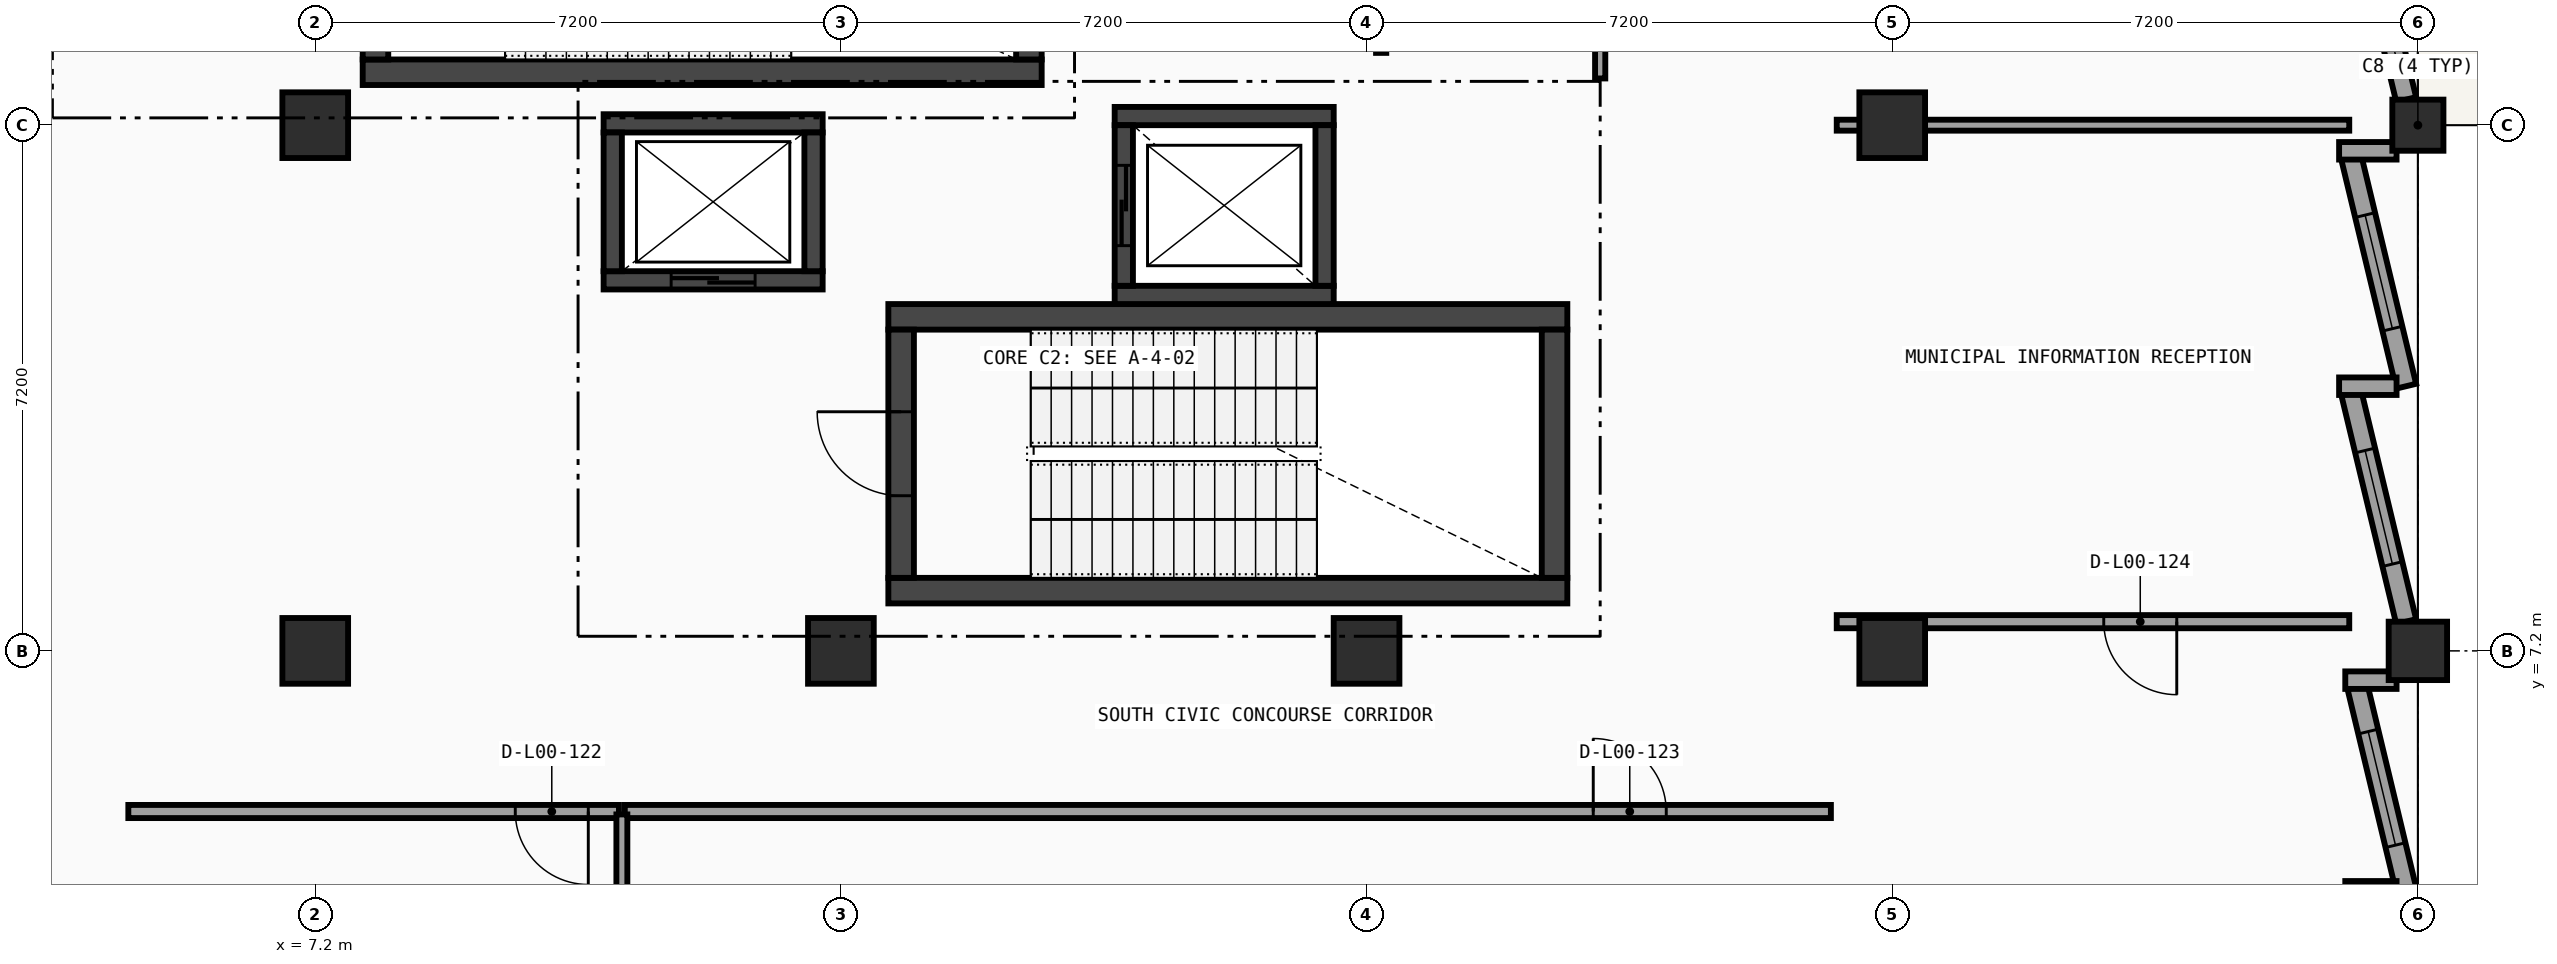
"""IFC4 building model, lengths in metres.
Left out: names, types, materials, properties, quantities, classifications, styles, units other than length and angle.
Written with IfcOpenShell. Run it as: python <this file> out.ifc"""

import sys

from ifc_helpers import new_model, si_unit, direction, frame, frame_2d, origin, origin_2d, place, context, subcontext, project, spatial, rectangle, circle, extrude, element, fill, save


model = new_model("IFC4")
c1 = context("Model", 3, precision=1e-05, world=origin(), true_north=direction((0.0, 1.0)))
c2 = subcontext(c1, "Body", "Model", "MODEL_VIEW")
j1 = project(units=[si_unit("LENGTHUNIT", "METRE"), si_unit("PLANEANGLEUNIT", "RADIAN")], contexts=[c1])
p1 = place(None, origin())
s1 = spatial("IfcSite", under=j1, at=p1, CompositionType="ELEMENT")
p2 = place(p1, origin())
s2 = spatial("IfcBuilding", under=s1, at=p2, CompositionType="ELEMENT")
p3 = place(p2, origin())
s3 = spatial("IfcBuildingStorey", under=s2, at=p3, CompositionType="ELEMENT", Elevation=0.0)
for number, where, z_axis, x_axis in (
    (1, (7.2, 7.2, 0.0), (0.0, 0.0, 1.0), (1.0, 0.0, 0.0)),
    (2, (7.2, 14.4, 0.0), (0.0, 0.0, 1.0), (1.0, 0.0, 0.0)),
    (3, (14.4, 7.2, 0.0), (0.0, 0.0, 1.0), (1.0, 0.0, 0.0)),
    (4, (21.6, 7.2, 0.0), (0.0, 0.0, 1.0), (1.0, 0.0, 0.0)),
    (5, (28.8, 7.2, 0.0), (0.0, 0.0, 1.0), (1.0, 0.0, 0.0)),
    (6, (28.8, 14.4, 0.0), (0.0, 0.0, 1.0), (1.0, 0.0, 0.0)),
):
    element("IfcColumn", number, at=place(p3, frame(where, z_axis=z_axis, x_axis=x_axis)), inside=s3, PredefinedType="COLUMN", context=c2, shape_type="SweptSolid", body=[
        extrude(rectangle(XDim=0.9, YDim=0.9, at=origin_2d()), origin(), (0.0, 0.0, 1.0), 5.4),
    ])
p4 = place(p3, frame((36.0, 7.2, 0.0), z_axis=(0.0, 0.0, 1.0), x_axis=(1.0, 0.0, 0.0)))
e7 = element("IfcColumn", 7, at=p4, inside=s3, PredefinedType="COLUMN", context=c2, shape_type="SweptSolid", body=[
    extrude(rectangle(XDim=0.8, YDim=0.8, at=origin_2d()), origin(), (0.0, 0.0, 1.0), 5.4),
])
p5 = place(p3, frame((36.0, 14.4, 0.0), z_axis=(0.0, 0.0, 1.0), x_axis=(1.0, 0.0, 0.0)))
e8 = element("IfcColumn", 8, at=p5, inside=s3, PredefinedType="COLUMN", context=c2, shape_type="SweptSolid", body=[
    extrude(circle(Radius=0.35, at=origin_2d()), origin(), (0.0, 0.0, 1.0), 5.4),
])
p6 = place(p3, frame((35.167, 17.555, 0.0), z_axis=(0.0, 0.0, 1.0), x_axis=(0.233481813001, -0.97236116901, 0.0)))
e9 = element("IfcWall", 9, at=p6, inside=s3, PredefinedType="SOLIDWALL", context=c2, shape_type="SweptSolid", body=[
    extrude(rectangle(XDim=2.884, YDim=0.28, at=frame_2d((1.442, 0.0))), origin(), (0.0, 0.0, 1.0), 4.461),
])
p7 = place(p6, frame((0.542, 0.0, 0.8)))
e10 = element("IfcOpeningElement", 10, at=p7, cuts=e9, PredefinedType="OPENING", context=c2, shape_type="SweptSolid", body=[
    extrude(rectangle(XDim=1.8, YDim=1.85, at=frame_2d((0.9, 0.925))), frame((0.0, 0.15, 0.0), z_axis=(0.0, -1.0, 0.0), x_axis=(1.0, 0.0, 0.0)), (0.0, 0.0, 1.0), 0.3),
])
p8 = place(p3, frame((35.088, 13.957, 0.0), z_axis=(0.0, 0.0, 1.0), x_axis=(0.233481900362, -0.972361148033, 0.0)))
e11 = element("IfcWall", 11, at=p8, inside=s3, PredefinedType="SOLIDWALL", context=c2, shape_type="SweptSolid", body=[
    extrude(rectangle(XDim=3.221, YDim=0.28, at=frame_2d((1.61, 0.0))), origin(), (0.0, 0.0, 1.0), 4.461),
])
p9 = place(p8, frame((0.81, 0.0, 0.8)))
e12 = element("IfcOpeningElement", 12, at=p9, cuts=e11, PredefinedType="OPENING", context=c2, shape_type="SweptSolid", body=[
    extrude(rectangle(XDim=1.6, YDim=1.75, at=frame_2d((0.8, 0.875))), frame((0.0, 0.15, 0.0), z_axis=(0.0, -1.0, 0.0), x_axis=(1.0, 0.0, 0.0)), (0.0, 0.0, 1.0), 0.3),
])
p10 = place(p3, frame((34.921, 14.049, 0.0), z_axis=(0.0, 0.0, 1.0), x_axis=(1.0, 0.0, 0.0)))
e13 = element("IfcWall", 13, at=p10, inside=s3, PredefinedType="SOLIDWALL", context=c2, shape_type="SweptSolid", body=[
    extrude(rectangle(XDim=0.787, YDim=0.24, at=frame_2d((0.394, 0.0))), origin(), (0.0, 0.0, 1.0), 5.12),
])
p11 = place(p3, frame((35.088, 10.733, 0.0), z_axis=(0.0, 0.0, 1.0), x_axis=(0.233481900362, -0.972361148033, 0.0)))
e14 = element("IfcWall", 14, at=p11, inside=s3, PredefinedType="SOLIDWALL", context=c2, shape_type="SweptSolid", body=[
    extrude(rectangle(XDim=3.221, YDim=0.28, at=frame_2d((1.61, 0.0))), origin(), (0.0, 0.0, 1.0), 4.461),
])
p12 = place(p11, frame((0.81, 0.0, 0.8)))
e15 = element("IfcOpeningElement", 15, at=p12, cuts=e14, PredefinedType="OPENING", context=c2, shape_type="SweptSolid", body=[
    extrude(rectangle(XDim=1.6, YDim=1.75, at=frame_2d((0.8, 0.875))), frame((0.0, 0.15, 0.0), z_axis=(0.0, -1.0, 0.0), x_axis=(1.0, 0.0, 0.0)), (0.0, 0.0, 1.0), 0.3),
])
p13 = place(p3, frame((34.921, 10.825, 0.0), z_axis=(0.0, 0.0, 1.0), x_axis=(1.0, 0.0, 0.0)))
e16 = element("IfcWall", 16, at=p13, inside=s3, PredefinedType="SOLIDWALL", context=c2, shape_type="SweptSolid", body=[
    extrude(rectangle(XDim=0.787, YDim=0.24, at=frame_2d((0.394, 0.0))), origin(), (0.0, 0.0, 1.0), 5.12),
])
p14 = place(p3, frame((35.173, 6.707, 0.0), z_axis=(0.0, 0.0, 1.0), x_axis=(0.233460183471, -0.972366362403, 0.0)))
e17 = element("IfcWall", 17, at=p14, inside=s3, PredefinedType="SOLIDWALL", context=c2, shape_type="SweptSolid", body=[
    extrude(rectangle(XDim=2.858, YDim=0.28, at=frame_2d((1.429, 0.0))), origin(), (0.0, 0.0, 1.0), 4.461),
])
p15 = place(p14, frame((0.629, 0.0, 0.8)))
e18 = element("IfcOpeningElement", 18, at=p15, cuts=e17, PredefinedType="OPENING", context=c2, shape_type="SweptSolid", body=[
    extrude(rectangle(XDim=1.6, YDim=1.75, at=frame_2d((0.8, 0.875))), frame((0.0, 0.15, 0.0), z_axis=(0.0, -1.0, 0.0), x_axis=(1.0, 0.0, 0.0)), (0.0, 0.0, 1.0), 0.3),
])
for number, where, z_axis, x_axis in (
    (19, (35.006, 6.799, 0.0), (0.0, 0.0, 1.0), (1.0, 0.0, 0.0)),
    (20, (35.006, 3.927, 0.0), (0.0, 0.0, 1.0), (1.0, 0.0, 0.0)),
):
    element("IfcWall", number, at=place(p3, frame(where, z_axis=z_axis, x_axis=x_axis)), inside=s3, PredefinedType="SOLIDWALL", context=c2, shape_type="SweptSolid", body=[
        extrude(rectangle(XDim=0.702, YDim=0.24, at=frame_2d((0.351, 0.0))), origin(), (0.0, 0.0, 1.0), 5.12),
    ])
p16 = place(p3, frame((7.85, 15.125, 0.0), z_axis=(0.0, 0.0, 1.0), x_axis=(1.0, 0.0, 0.0)))
e21 = element("IfcWall", 21, at=p16, inside=s3, PredefinedType="SHEAR", context=c2, shape_type="SweptSolid", body=[
    extrude(rectangle(XDim=9.3, YDim=0.35, at=frame_2d((4.65, 0.0))), origin(), (0.0, 0.0, 1.0), 5.12),
])
p17 = place(p3, frame((8.025, 18.7, 0.0), z_axis=(0.0, 0.0, 1.0), x_axis=(0.0, -1.0, 0.0)))
e22 = element("IfcWall", 22, at=p17, inside=s3, PredefinedType="SHEAR", context=c2, shape_type="SweptSolid", body=[
    extrude(rectangle(XDim=3.4, YDim=0.35, at=frame_2d((1.7, 0.0))), origin(), (0.0, 0.0, 1.0), 5.12),
])
p18 = place(p17, frame((1.125, 0.0, 0.0)))
e23 = element("IfcOpeningElement", 23, at=p18, cuts=e22, PredefinedType="OPENING", context=c2, shape_type="SweptSolid", body=[
    extrude(rectangle(XDim=1.15, YDim=2.1, at=frame_2d((0.575, 1.05))), frame((0.0, 0.185, 0.0), z_axis=(0.0, -1.0, 0.0), x_axis=(1.0, 0.0, 0.0)), (0.0, 0.0, 1.0), 0.37),
])
p19 = place(p3, frame((16.975, 15.3, 0.0), z_axis=(0.0, 0.0, 1.0), x_axis=(0.0, 1.0, 0.0)))
e24 = element("IfcWall", 24, at=p19, inside=s3, PredefinedType="SHEAR", context=c2, shape_type="SweptSolid", body=[
    extrude(rectangle(XDim=3.4, YDim=0.35, at=frame_2d((1.7, 0.0))), origin(), (0.0, 0.0, 1.0), 5.12),
])
for number, where, z_axis, x_axis in (
    (25, (15.05, 8.025, 0.0), (0.0, 0.0, 1.0), (1.0, 0.0, 0.0)),
    (26, (24.35, 11.775, 0.0), (0.0, 0.0, 1.0), (-1.0, 0.0, 0.0)),
):
    element("IfcWall", number, at=place(p3, frame(where, z_axis=z_axis, x_axis=x_axis)), inside=s3, PredefinedType="SHEAR", context=c2, shape_type="SweptSolid", body=[
        extrude(rectangle(XDim=9.3, YDim=0.35, at=frame_2d((4.65, 0.0))), origin(), (0.0, 0.0, 1.0), 5.12),
    ])
p20 = place(p3, frame((15.225, 11.6, 0.0), z_axis=(0.0, 0.0, 1.0), x_axis=(0.0, -1.0, 0.0)))
e27 = element("IfcWall", 27, at=p20, inside=s3, PredefinedType="SHEAR", context=c2, shape_type="SweptSolid", body=[
    extrude(rectangle(XDim=3.4, YDim=0.35, at=frame_2d((1.7, 0.0))), origin(), (0.0, 0.0, 1.0), 5.12),
])
p21 = place(p20, frame((1.125, 0.0, 0.0)))
e28 = element("IfcOpeningElement", 28, at=p21, cuts=e27, PredefinedType="OPENING", context=c2, shape_type="SweptSolid", body=[
    extrude(rectangle(XDim=1.15, YDim=2.1, at=frame_2d((0.575, 1.05))), frame((0.0, 0.185, 0.0), z_axis=(0.0, -1.0, 0.0), x_axis=(1.0, 0.0, 0.0)), (0.0, 0.0, 1.0), 0.37),
])
p22 = place(p3, frame((24.175, 8.2, 0.0), z_axis=(0.0, 0.0, 1.0), x_axis=(0.0, 1.0, 0.0)))
e29 = element("IfcWall", 29, at=p22, inside=s3, PredefinedType="SHEAR", context=c2, shape_type="SweptSolid", body=[
    extrude(rectangle(XDim=3.4, YDim=0.35, at=frame_2d((1.7, 0.0))), origin(), (0.0, 0.0, 1.0), 5.12),
])
p23 = place(p3, frame((11.15, 12.275, 0.0), z_axis=(0.0, 0.0, 1.0), x_axis=(1.0, 0.0, 0.0)))
e30 = element("IfcWall", 30, at=p23, inside=s3, PredefinedType="SHEAR", context=c2, shape_type="SweptSolid", body=[
    extrude(rectangle(XDim=3.0, YDim=0.25, at=frame_2d((1.5, 0.0))), origin(), (0.0, 0.0, 1.0), 5.12),
])
p24 = place(p23, frame((0.925, 0.0, 0.0)))
e31 = element("IfcOpeningElement", 31, at=p24, cuts=e30, PredefinedType="OPENING", context=c2, shape_type="SweptSolid", body=[
    extrude(rectangle(XDim=1.15, YDim=2.1, at=frame_2d((0.575, 1.05))), frame((0.0, 0.135, 0.0), z_axis=(0.0, -1.0, 0.0), x_axis=(1.0, 0.0, 0.0)), (0.0, 0.0, 1.0), 0.27),
])
p25 = place(p3, frame((14.15, 14.425, 0.0), z_axis=(0.0, 0.0, 1.0), x_axis=(-1.0, 0.0, 0.0)))
e32 = element("IfcWall", 32, at=p25, inside=s3, PredefinedType="SHEAR", context=c2, shape_type="SweptSolid", body=[
    extrude(rectangle(XDim=3.0, YDim=0.25, at=frame_2d((1.5, 0.0))), origin(), (0.0, 0.0, 1.0), 5.12),
])
for number, where, z_axis, x_axis in (
    (33, (11.275, 14.3, 0.0), (0.0, 0.0, 1.0), (0.0, -1.0, 0.0)),
    (34, (14.025, 12.4, 0.0), (0.0, 0.0, 1.0), (0.0, 1.0, 0.0)),
):
    element("IfcWall", number, at=place(p3, frame(where, z_axis=z_axis, x_axis=x_axis)), inside=s3, PredefinedType="SHEAR", context=c2, shape_type="SweptSolid", body=[
        extrude(rectangle(XDim=1.9, YDim=0.25, at=frame_2d((0.95, 0.0))), origin(), (0.0, 0.0, 1.0), 5.12),
    ])
for number, where, z_axis, x_axis in (
    (35, (18.15, 12.075, 0.0), (0.0, 0.0, 1.0), (1.0, 0.0, 0.0)),
    (36, (21.15, 14.525, 0.0), (0.0, 0.0, 1.0), (-1.0, 0.0, 0.0)),
):
    element("IfcWall", number, at=place(p3, frame(where, z_axis=z_axis, x_axis=x_axis)), inside=s3, PredefinedType="SHEAR", context=c2, shape_type="SweptSolid", body=[
        extrude(rectangle(XDim=3.0, YDim=0.25, at=frame_2d((1.5, 0.0))), origin(), (0.0, 0.0, 1.0), 5.12),
    ])
p26 = place(p3, frame((18.275, 14.4, 0.0), z_axis=(0.0, 0.0, 1.0), x_axis=(0.0, -1.0, 0.0)))
e37 = element("IfcWall", 37, at=p26, inside=s3, PredefinedType="SHEAR", context=c2, shape_type="SweptSolid", body=[
    extrude(rectangle(XDim=2.2, YDim=0.25, at=frame_2d((1.1, 0.0))), origin(), (0.0, 0.0, 1.0), 5.12),
])
p27 = place(p26, frame((0.55, 0.0, 0.0)))
e38 = element("IfcOpeningElement", 38, at=p27, cuts=e37, PredefinedType="OPENING", context=c2, shape_type="SweptSolid", body=[
    extrude(rectangle(XDim=1.1, YDim=2.1, at=frame_2d((0.55, 1.05))), frame((0.0, 0.135, 0.0), z_axis=(0.0, -1.0, 0.0), x_axis=(1.0, 0.0, 0.0)), (0.0, 0.0, 1.0), 0.27),
])
p28 = place(p3, frame((21.025, 12.2, 0.0), z_axis=(0.0, 0.0, 1.0), x_axis=(0.0, 1.0, 0.0)))
e39 = element("IfcWall", 39, at=p28, inside=s3, PredefinedType="SHEAR", context=c2, shape_type="SweptSolid", body=[
    extrude(rectangle(XDim=2.2, YDim=0.25, at=frame_2d((1.1, 0.0))), origin(), (0.0, 0.0, 1.0), 5.12),
])
p29 = place(p3, frame((4.64, 5.0, 0.0), z_axis=(0.0, 0.0, 1.0), x_axis=(1.0, 0.0, 0.0)))
e40 = element("IfcWall", 40, at=p29, inside=s3, PredefinedType="PARTITIONING", context=c2, shape_type="SweptSolid", body=[
    extrude(rectangle(XDim=6.72, YDim=0.18, at=frame_2d((3.36, 0.0))), origin(), (0.0, 0.0, 1.0), 4.311),
])
p30 = place(p29, frame((5.3, 0.0, 0.0)))
e41 = element("IfcOpeningElement", 41, at=p30, cuts=e40, PredefinedType="OPENING", context=c2, shape_type="SweptSolid", body=[
    extrude(rectangle(XDim=1.0, YDim=2.1, at=frame_2d((0.5, 1.05))), frame((0.0, 0.1, 0.0), z_axis=(0.0, -1.0, 0.0), x_axis=(1.0, 0.0, 0.0)), (0.0, 0.0, 1.0), 0.2),
])
p31 = place(p3, frame((11.44, 5.0, 0.0), z_axis=(0.0, 0.0, 1.0), x_axis=(1.0, 0.0, 0.0)))
e42 = element("IfcWall", 42, at=p31, inside=s3, PredefinedType="PARTITIONING", context=c2, shape_type="SweptSolid", body=[
    extrude(rectangle(XDim=16.52, YDim=0.18, at=frame_2d((8.26, 0.0))), origin(), (0.0, 0.0, 1.0), 4.311),
])
p32 = place(p31, frame((13.265, 0.0, 0.0)))
e43 = element("IfcOpeningElement", 43, at=p32, cuts=e42, PredefinedType="OPENING", context=c2, shape_type="SweptSolid", body=[
    extrude(rectangle(XDim=1.0, YDim=2.1, at=frame_2d((0.5, 1.05))), frame((0.0, 0.1, 0.0), z_axis=(0.0, -1.0, 0.0), x_axis=(1.0, 0.0, 0.0)), (0.0, 0.0, 1.0), 0.2),
])
p33 = place(p3, frame((28.04, 7.6, 0.0), z_axis=(0.0, 0.0, 1.0), x_axis=(1.0, 0.0, 0.0)))
e44 = element("IfcWall", 44, at=p33, inside=s3, PredefinedType="PARTITIONING", context=c2, shape_type="SweptSolid", body=[
    extrude(rectangle(XDim=7.02, YDim=0.18, at=frame_2d((3.51, 0.0))), origin(), (0.0, 0.0, 1.0), 4.311),
])
p34 = place(p33, frame((3.657, 0.0, 0.0)))
e45 = element("IfcOpeningElement", 45, at=p34, cuts=e44, PredefinedType="OPENING", context=c2, shape_type="SweptSolid", body=[
    extrude(rectangle(XDim=1.0, YDim=2.1, at=frame_2d((0.5, 1.05))), frame((0.0, 0.1, 0.0), z_axis=(0.0, -1.0, 0.0), x_axis=(1.0, 0.0, 0.0)), (0.0, 0.0, 1.0), 0.2),
])
p35 = place(p3, frame((11.4, 0.94, 0.0), z_axis=(0.0, 0.0, 1.0), x_axis=(0.0, 1.0, 0.0)))
e46 = element("IfcWall", 46, at=p35, inside=s3, PredefinedType="PARTITIONING", context=c2, shape_type="SweptSolid", body=[
    extrude(rectangle(XDim=4.02, YDim=0.15, at=frame_2d((2.01, 0.0))), origin(), (0.0, 0.0, 1.0), 4.606),
])
p36 = place(p3, frame((28.04, 14.4, 0.0), z_axis=(0.0, 0.0, 1.0), x_axis=(1.0, 0.0, 0.0)))
e47 = element("IfcWall", 47, at=p36, inside=s3, PredefinedType="PARTITIONING", context=c2, shape_type="SweptSolid", body=[
    extrude(rectangle(XDim=7.02, YDim=0.15, at=frame_2d((3.51, 0.0))), origin(), (0.0, 0.0, 1.0), 4.311),
])
p37 = place(p3, frame((24.8, 15.04, 0.0), z_axis=(0.0, 0.0, 1.0), x_axis=(0.0, 1.0, 0.0)))
e48 = element("IfcWall", 48, at=p37, inside=s3, PredefinedType="PARTITIONING", context=c2, shape_type="SweptSolid", body=[
    extrude(rectangle(XDim=7.12, YDim=0.14, at=frame_2d((3.56, 0.0))), origin(), (0.0, 0.0, 1.0), 4.45),
])
p38 = place(p3, frame((21.8, 15.39, 0.0), z_axis=(0.0, 0.0, 1.0), x_axis=(0.0, 1.0, 0.0)))
e49 = element("IfcWall", 49, at=p38, inside=s3, PredefinedType="PARTITIONING", context=c2, shape_type="SweptSolid", body=[
    extrude(rectangle(XDim=2.97, YDim=0.14, at=frame_2d((1.485, 0.0))), origin(), (0.0, 0.0, 1.0), 5.12),
])
p39 = place(p7, origin())
e50 = element("IfcWindow", 50, at=p39, inside=s3, PartitioningType="SINGLE_PANEL", PredefinedType="WINDOW", context=c2, shape_type="SweptSolid", body=[
    extrude(rectangle(XDim=1.8, YDim=1.85, at=frame_2d((0.9, 0.925))), frame((0.0, 0.03, 0.0), z_axis=(0.0, -1.0, 0.0), x_axis=(1.0, 0.0, 0.0)), (0.0, 0.0, 1.0), 0.06),
])
fill(e10, e50)
p40 = place(p9, origin())
e51 = element("IfcWindow", 51, at=p40, inside=s3, PartitioningType="SINGLE_PANEL", PredefinedType="WINDOW", context=c2, shape_type="SweptSolid", body=[
    extrude(rectangle(XDim=1.6, YDim=1.75, at=frame_2d((0.8, 0.875))), frame((0.0, 0.03, 0.0), z_axis=(0.0, -1.0, 0.0), x_axis=(1.0, 0.0, 0.0)), (0.0, 0.0, 1.0), 0.06),
])
fill(e12, e51)
p41 = place(p12, origin())
e52 = element("IfcWindow", 52, at=p41, inside=s3, PartitioningType="SINGLE_PANEL", PredefinedType="WINDOW", context=c2, shape_type="SweptSolid", body=[
    extrude(rectangle(XDim=1.6, YDim=1.75, at=frame_2d((0.8, 0.875))), frame((0.0, 0.03, 0.0), z_axis=(0.0, -1.0, 0.0), x_axis=(1.0, 0.0, 0.0)), (0.0, 0.0, 1.0), 0.06),
])
fill(e15, e52)
p42 = place(p15, origin())
e53 = element("IfcWindow", 53, at=p42, inside=s3, PartitioningType="SINGLE_PANEL", PredefinedType="WINDOW", context=c2, shape_type="SweptSolid", body=[
    extrude(rectangle(XDim=1.6, YDim=1.75, at=frame_2d((0.8, 0.875))), frame((0.0, 0.03, 0.0), z_axis=(0.0, -1.0, 0.0), x_axis=(1.0, 0.0, 0.0)), (0.0, 0.0, 1.0), 0.06),
])
fill(e18, e53)
p43 = place(p21, frame((1.15, 0.0, 0.0), z_axis=(0.0, 0.0, 1.0), x_axis=(-1.0, 0.0, 0.0)))
e54 = element("IfcDoor", 54, at=p43, inside=s3, OperationType="SINGLE_SWING_RIGHT", PredefinedType="DOOR", context=c2, shape_type="SweptSolid", body=[
    extrude(rectangle(XDim=1.15, YDim=2.1, at=frame_2d((0.575, 1.05))), frame((0.0, 0.025, 0.0), z_axis=(0.0, -1.0, 0.0), x_axis=(1.0, 0.0, 0.0)), (0.0, 0.0, 1.0), 0.05),
])
fill(e28, e54)
p44 = place(p24, origin())
e55 = element("IfcDoor", 55, at=p44, inside=s3, OperationType="SLIDING_TO_RIGHT", PredefinedType="DOOR", context=c2, shape_type="SweptSolid", body=[
    extrude(rectangle(XDim=1.15, YDim=2.1, at=frame_2d((0.575, 1.05))), frame((0.0, 0.025, 0.0), z_axis=(0.0, -1.0, 0.0), x_axis=(1.0, 0.0, 0.0)), (0.0, 0.0, 1.0), 0.05),
])
fill(e31, e55)
p45 = place(p27, origin())
e56 = element("IfcDoor", 56, at=p45, inside=s3, OperationType="SLIDING_TO_LEFT", PredefinedType="DOOR", context=c2, shape_type="SweptSolid", body=[
    extrude(rectangle(XDim=1.1, YDim=2.1, at=frame_2d((0.55, 1.05))), frame((0.0, 0.025, 0.0), z_axis=(0.0, -1.0, 0.0), x_axis=(1.0, 0.0, 0.0)), (0.0, 0.0, 1.0), 0.05),
])
fill(e38, e56)
p46 = place(p30, origin())
e57 = element("IfcDoor", 57, at=p46, inside=s3, OperationType="SINGLE_SWING_RIGHT", PredefinedType="DOOR", context=c2, shape_type="SweptSolid", body=[
    extrude(rectangle(XDim=1.0, YDim=2.1, at=frame_2d((0.5, 1.05))), frame((0.0, 0.025, 0.0), z_axis=(0.0, -1.0, 0.0), x_axis=(1.0, 0.0, 0.0)), (0.0, 0.0, 1.0), 0.05),
])
fill(e41, e57)
p47 = place(p32, origin())
e58 = element("IfcDoor", 58, at=p47, inside=s3, OperationType="SINGLE_SWING_LEFT", PredefinedType="DOOR", context=c2, shape_type="SweptSolid", body=[
    extrude(rectangle(XDim=1.0, YDim=2.1, at=frame_2d((0.5, 1.05))), frame((0.0, 0.025, 0.0), z_axis=(0.0, -1.0, 0.0), x_axis=(1.0, 0.0, 0.0)), (0.0, 0.0, 1.0), 0.05),
])
fill(e43, e58)
p48 = place(p34, origin())
e59 = element("IfcDoor", 59, at=p48, inside=s3, OperationType="SINGLE_SWING_RIGHT", PredefinedType="DOOR", context=c2, shape_type="SweptSolid", body=[
    extrude(rectangle(XDim=1.0, YDim=2.1, at=frame_2d((0.5, 1.05))), frame((0.0, 0.025, 0.0), z_axis=(0.0, -1.0, 0.0), x_axis=(1.0, 0.0, 0.0)), (0.0, 0.0, 1.0), 0.05),
])
fill(e45, e59)
save(model, sys.argv[1])
